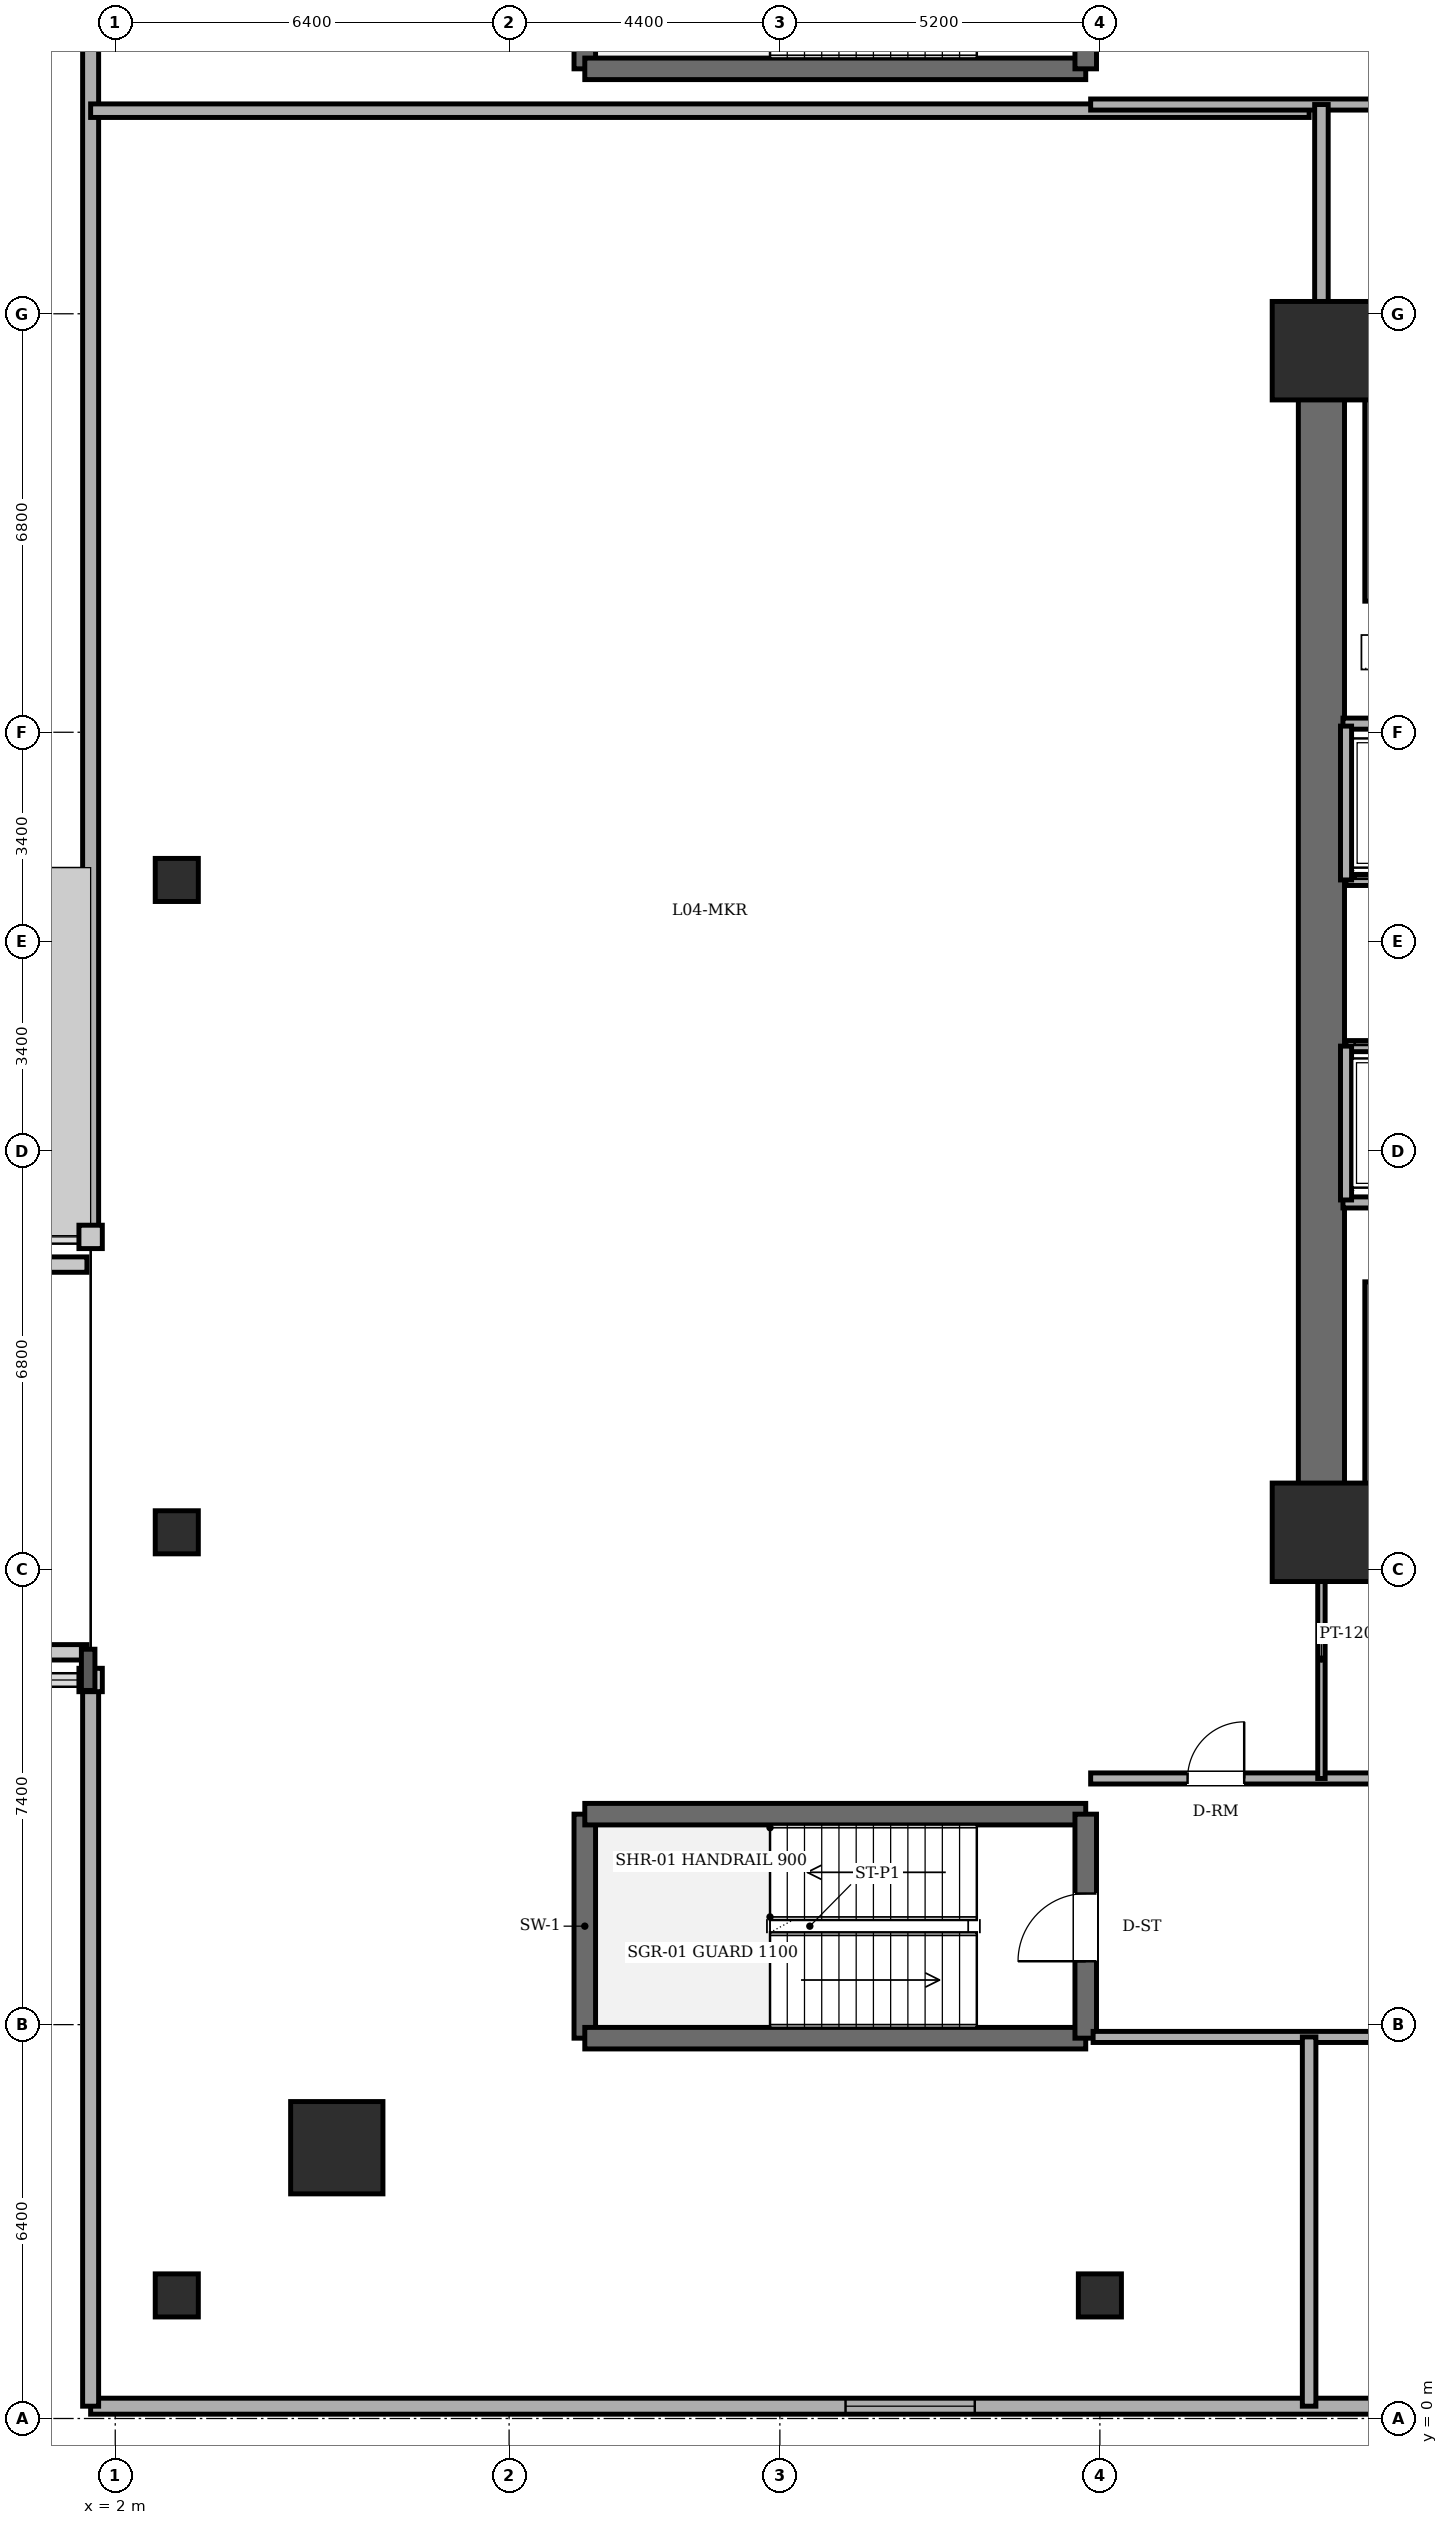
"""IFC4 building model, lengths in metres.
Left out: names, types, materials, properties, quantities, classifications, styles, units other than length and angle.
Written with IfcOpenShell. Run it as: python <this file> out.ifc"""

import sys

from ifc_helpers import new_model, si_unit, direction, frame, frame_2d, origin, origin_2d, place, context, subcontext, project, spatial, rectangle, circle, extrude, element, fill, save


model = new_model("IFC4")
c1 = context("Model", 3, precision=1e-05, world=origin(), true_north=direction((0.0, 1.0)))
c2 = subcontext(c1, "Body", "Model", "MODEL_VIEW")
j1 = project(units=[si_unit("LENGTHUNIT", "METRE"), si_unit("PLANEANGLEUNIT", "RADIAN")], contexts=[c1])
p1 = place(None, origin())
s1 = spatial("IfcSite", under=j1, at=p1, CompositionType="ELEMENT")
p2 = place(p1, origin())
s2 = spatial("IfcBuilding", under=s1, at=p2, CompositionType="ELEMENT")
p3 = place(p2, frame((0.0, 0.0, 14.7)))
s3 = spatial("IfcBuildingStorey", under=s2, at=p3, CompositionType="ELEMENT", Elevation=14.7)
for number, where, z_axis, x_axis in (
    (1, (21.6, 14.4, 0.0), (0.0, 0.0, 1.0), (1.0, 0.0, 0.0)),
    (2, (21.6, 33.6, 0.0), (0.0, 0.0, 1.0), (1.0, 0.0, 0.0)),
):
    element("IfcColumn", number, at=place(p3, frame(where, z_axis=z_axis, x_axis=x_axis)), inside=s3, PredefinedType="COLUMN", context=c2, shape_type="SweptSolid", body=[
        extrude(rectangle(XDim=1.6, YDim=1.6, at=origin_2d()), origin(), (0.0, 0.0, 1.0), 4.65),
    ])
p4 = place(p3, frame((5.6, 4.4, 0.0), z_axis=(0.0, 0.0, 1.0), x_axis=(1.0, 0.0, 0.0)))
e3 = element("IfcColumn", 3, at=p4, inside=s3, PredefinedType="COLUMN", context=c2, shape_type="SweptSolid", body=[
    extrude(circle(Radius=0.75, at=origin_2d()), origin(), (0.0, 0.0, 1.0), 4.65),
])
for number, where, z_axis, x_axis in (
    (4, (3.0, 2.0, 0.0), (0.0, 0.0, 1.0), (1.0, 0.0, 0.0)),
    (5, (18.0, 2.0, 0.0), (0.0, 0.0, 1.0), (1.0, 0.0, 0.0)),
    (6, (3.0, 14.4, 0.0), (0.0, 0.0, 1.0), (1.0, 0.0, 0.0)),
    (7, (3.0, 25.0, 0.0), (0.0, 0.0, 1.0), (1.0, 0.0, 0.0)),
):
    element("IfcColumn", number, at=place(p3, frame(where, z_axis=z_axis, x_axis=x_axis)), inside=s3, PredefinedType="COLUMN", context=c2, shape_type="SweptSolid", body=[
        extrude(rectangle(XDim=0.7, YDim=0.7, at=origin_2d()), origin(), (0.0, 0.0, 1.0), 4.65),
    ])
p5 = place(p3, frame((67.8, 0.2, 0.0), z_axis=(0.0, 0.0, 1.0), x_axis=(-1.0, 0.0, 0.0)))
e8 = element("IfcWall", 8, at=p5, inside=s3, PredefinedType="SOLIDWALL", context=c2, shape_type="SweptSolid", body=[
    extrude(rectangle(XDim=66.2, YDim=0.26, at=frame_2d((33.1, 0.0))), origin(), (0.0, 0.0, 1.0), 4.45),
])
p6 = place(p5, frame((8.517, 0.0, 0.9)))
e9 = element("IfcOpeningElement", 9, at=p6, cuts=e8, PredefinedType="OPENING", context=c2, shape_type="SweptSolid", body=[
    extrude(rectangle(XDim=2.1, YDim=2.0, at=frame_2d((1.05, 1.0))), frame((0.0, 0.14, 0.0), z_axis=(0.0, -1.0, 0.0), x_axis=(1.0, 0.0, 0.0)), (0.0, 0.0, 1.0), 0.28),
])
p7 = place(p5, frame((17.733, 0.0, 0.9)))
e10 = element("IfcOpeningElement", 10, at=p7, cuts=e8, PredefinedType="OPENING", context=c2, shape_type="SweptSolid", body=[
    extrude(rectangle(XDim=2.1, YDim=2.0, at=frame_2d((1.05, 1.0))), frame((0.0, 0.14, 0.0), z_axis=(0.0, -1.0, 0.0), x_axis=(1.0, 0.0, 0.0)), (0.0, 0.0, 1.0), 0.28),
])
p8 = place(p5, frame((33.083, 0.0, 0.9)))
e11 = element("IfcOpeningElement", 11, at=p8, cuts=e8, PredefinedType="OPENING", context=c2, shape_type="SweptSolid", body=[
    extrude(rectangle(XDim=2.1, YDim=2.0, at=frame_2d((1.05, 1.0))), frame((0.0, 0.14, 0.0), z_axis=(0.0, -1.0, 0.0), x_axis=(1.0, 0.0, 0.0)), (0.0, 0.0, 1.0), 0.28),
])
p9 = place(p5, frame((39.217, 0.0, 0.9)))
e12 = element("IfcOpeningElement", 12, at=p9, cuts=e8, PredefinedType="OPENING", context=c2, shape_type="SweptSolid", body=[
    extrude(rectangle(XDim=2.1, YDim=2.0, at=frame_2d((1.05, 1.0))), frame((0.0, 0.14, 0.0), z_axis=(0.0, -1.0, 0.0), x_axis=(1.0, 0.0, 0.0)), (0.0, 0.0, 1.0), 0.28),
])
p10 = place(p5, frame((51.833, 0.0, 0.9)))
e13 = element("IfcOpeningElement", 13, at=p10, cuts=e8, PredefinedType="OPENING", context=c2, shape_type="SweptSolid", body=[
    extrude(rectangle(XDim=2.1, YDim=2.0, at=frame_2d((1.05, 1.0))), frame((0.0, 0.14, 0.0), z_axis=(0.0, -1.0, 0.0), x_axis=(1.0, 0.0, 0.0)), (0.0, 0.0, 1.0), 0.28),
])
p11 = place(p3, frame((1.6, 0.2, 0.0), z_axis=(0.0, 0.0, 1.0), x_axis=(0.0, 1.0, 0.0)))
e14 = element("IfcWall", 14, at=p11, inside=s3, PredefinedType="SOLIDWALL", context=c2, shape_type="SweptSolid", body=[
    extrude(rectangle(XDim=11.8, YDim=0.26, at=frame_2d((5.9, 0.0))), origin(), (0.0, 0.0, 1.0), 4.45),
])
p12 = place(p3, frame((1.6, 19.2, 0.0), z_axis=(0.0, 0.0, 1.0), x_axis=(0.0, 1.0, 0.0)))
e15 = element("IfcWall", 15, at=p12, inside=s3, PredefinedType="SOLIDWALL", context=c2, shape_type="SweptSolid", body=[
    extrude(rectangle(XDim=28.6, YDim=0.26, at=frame_2d((14.3, 0.0))), origin(), (0.0, 0.0, 1.0), 4.45),
])
p13 = place(p3, frame((9.63, 6.18, 0.0), z_axis=(0.0, 0.0, 1.0), x_axis=(0.0, 1.0, 0.0)))
e16 = element("IfcWall", 16, at=p13, inside=s3, PredefinedType="SOLIDWALL", context=c2, shape_type="SweptSolid", body=[
    extrude(rectangle(XDim=3.64, YDim=0.35, at=frame_2d((1.82, 0.0))), origin(), (0.0, 0.0, 1.0), 4.65),
])
for number, where, z_axis, x_axis in (
    (17, (9.63, 9.82, 0.0), (0.0, 0.0, 1.0), (1.0, 0.0, 0.0)),
    (18, (17.77, 6.18, 0.0), (0.0, 0.0, 1.0), (-1.0, 0.0, 0.0)),
):
    element("IfcWall", number, at=place(p3, frame(where, z_axis=z_axis, x_axis=x_axis)), inside=s3, PredefinedType="SOLIDWALL", context=c2, shape_type="SweptSolid", body=[
        extrude(rectangle(XDim=8.14, YDim=0.35, at=frame_2d((4.07, 0.0))), origin(), (0.0, 0.0, 1.0), 4.65),
    ])
p14 = place(p3, frame((17.77, 6.18, 0.0), z_axis=(0.0, 0.0, 1.0), x_axis=(0.0, 1.0, 0.0)))
e19 = element("IfcWall", 19, at=p14, inside=s3, PredefinedType="SOLIDWALL", context=c2, shape_type="SweptSolid", body=[
    extrude(rectangle(XDim=3.64, YDim=0.35, at=frame_2d((1.82, 0.0))), origin(), (0.0, 0.0, 1.0), 4.65),
])
p15 = place(p14, frame((1.25, 0.0, 0.0)))
e20 = element("IfcOpeningElement", 20, at=p15, cuts=e19, PredefinedType="OPENING", context=c2, shape_type="SweptSolid", body=[
    extrude(rectangle(XDim=1.1, YDim=2.15, at=frame_2d((0.55, 1.075))), frame((0.0, 0.185, 0.0), z_axis=(0.0, -1.0, 0.0), x_axis=(1.0, 0.0, 0.0)), (0.0, 0.0, 1.0), 0.37),
])
p16 = place(p3, frame((9.63, 38.18, 0.0), z_axis=(0.0, 0.0, 1.0), x_axis=(0.0, 1.0, 0.0)))
e21 = element("IfcWall", 21, at=p16, inside=s3, PredefinedType="SOLIDWALL", context=c2, shape_type="SweptSolid", body=[
    extrude(rectangle(XDim=3.64, YDim=0.35, at=frame_2d((1.82, 0.0))), origin(), (0.0, 0.0, 1.0), 4.65),
])
p17 = place(p3, frame((17.77, 38.18, 0.0), z_axis=(0.0, 0.0, 1.0), x_axis=(-1.0, 0.0, 0.0)))
e22 = element("IfcWall", 22, at=p17, inside=s3, PredefinedType="SOLIDWALL", context=c2, shape_type="SweptSolid", body=[
    extrude(rectangle(XDim=8.14, YDim=0.35, at=frame_2d((4.07, 0.0))), origin(), (0.0, 0.0, 1.0), 4.65),
])
p18 = place(p3, frame((17.77, 38.18, 0.0), z_axis=(0.0, 0.0, 1.0), x_axis=(0.0, 1.0, 0.0)))
e23 = element("IfcWall", 23, at=p18, inside=s3, PredefinedType="SOLIDWALL", context=c2, shape_type="SweptSolid", body=[
    extrude(rectangle(XDim=3.64, YDim=0.35, at=frame_2d((1.82, 0.0))), origin(), (0.0, 0.0, 1.0), 4.65),
])
p19 = place(p18, frame((1.25, 0.0, 0.0)))
e24 = element("IfcOpeningElement", 24, at=p19, cuts=e23, PredefinedType="OPENING", context=c2, shape_type="SweptSolid", body=[
    extrude(rectangle(XDim=1.1, YDim=2.15, at=frame_2d((0.55, 1.075))), frame((0.0, 0.185, 0.0), z_axis=(0.0, -1.0, 0.0), x_axis=(1.0, 0.0, 0.0)), (0.0, 0.0, 1.0), 0.37),
])
p20 = place(p3, frame((21.6, 14.4, 0.0), z_axis=(0.0, 0.0, 1.0), x_axis=(0.0, 1.0, 0.0)))
e25 = element("IfcWall", 25, at=p20, inside=s3, PredefinedType="SHEAR", context=c2, shape_type="SweptSolid", body=[
    extrude(rectangle(XDim=19.2, YDim=0.75, at=frame_2d((9.6, 0.0))), origin(), (0.0, 0.0, 1.0), 4.45),
])
for number, where, z_axis, x_axis in (
    (26, (21.6, 33.6, 0.0), (0.0, 0.0, 1.0), (1.0, 0.0, 0.0)),
    (27, (37.2, 14.4, 0.0), (0.0, 0.0, 1.0), (-1.0, 0.0, 0.0)),
):
    element("IfcWall", number, at=place(p3, frame(where, z_axis=z_axis, x_axis=x_axis)), inside=s3, PredefinedType="SHEAR", context=c2, shape_type="SweptSolid", body=[
        extrude(rectangle(XDim=15.6, YDim=0.75, at=frame_2d((7.8, 0.0))), origin(), (0.0, 0.0, 1.0), 4.45),
    ])
for number, where, z_axis, x_axis in (
    (28, (22.48, 29.53, 0.0), (0.0, 0.0, 1.0), (0.0, 1.0, 0.0)),
    (29, (22.48, 14.89, 0.0), (0.0, 0.0, 1.0), (0.0, 1.0, 0.0)),
):
    element("IfcWall", number, at=place(p3, frame(where, z_axis=z_axis, x_axis=x_axis)), inside=s3, PredefinedType="SOLIDWALL", context=c2, shape_type="SweptSolid", body=[
        extrude(rectangle(XDim=3.58, YDim=0.35, at=frame_2d((1.79, 0.0))), origin(), (0.0, 0.0, 1.0), 4.45),
    ])
p21 = place(p3, frame((21.95, 27.54, 0.0), z_axis=(0.0, 0.0, 1.0), x_axis=(1.0, 0.0, 0.0)))
e30 = element("IfcWall", 30, at=p21, inside=s3, PredefinedType="PARTITIONING", context=c2, shape_type="SweptSolid", body=[
    extrude(rectangle(XDim=10.56, YDim=0.18, at=frame_2d((5.28, 0.0))), origin(), (0.0, 0.0, 1.0), 4.45),
])
p22 = place(p3, frame((21.95, 19.76, 0.0), z_axis=(0.0, 0.0, 1.0), x_axis=(1.0, 0.0, 0.0)))
e31 = element("IfcWall", 31, at=p22, inside=s3, PredefinedType="PARTITIONING", context=c2, shape_type="SweptSolid", body=[
    extrude(rectangle(XDim=14.87, YDim=0.18, at=frame_2d((7.435, 0.0))), origin(), (0.0, 0.0, 1.0), 4.45),
])
p23 = place(p3, frame((24.02, 25.0, 0.0), z_axis=(0.0, 0.0, 1.0), x_axis=(-1.0, 0.0, 0.0)))
e32 = element("IfcWall", 32, at=p23, inside=s3, PredefinedType="PARTITIONING", context=c2, shape_type="SweptSolid", body=[
    extrude(rectangle(XDim=2.02, YDim=0.18, at=frame_2d((1.01, 0.0))), origin(), (0.0, 0.0, 1.0), 4.45),
])
p24 = place(p23, frame((0.435, 0.0, 0.0)))
e33 = element("IfcOpeningElement", 33, at=p24, cuts=e32, PredefinedType="OPENING", context=c2, shape_type="SweptSolid", body=[
    extrude(rectangle(XDim=1.15, YDim=2.2, at=frame_2d((0.575, 1.1))), frame((0.0, 0.1, 0.0), z_axis=(0.0, -1.0, 0.0), x_axis=(1.0, 0.0, 0.0)), (0.0, 0.0, 1.0), 0.2),
])
p25 = place(p3, frame((22.0, 27.5, 0.0), z_axis=(0.0, 0.0, 1.0), x_axis=(0.0, -1.0, 0.0)))
e34 = element("IfcWall", 34, at=p25, inside=s3, PredefinedType="PARTITIONING", context=c2, shape_type="SweptSolid", body=[
    extrude(rectangle(XDim=2.5, YDim=0.18, at=frame_2d((1.25, 0.0))), origin(), (0.0, 0.0, 1.0), 4.45),
])
p26 = place(p3, frame((22.0, 22.3, 0.0), z_axis=(0.0, 0.0, 1.0), x_axis=(1.0, 0.0, 0.0)))
e35 = element("IfcWall", 35, at=p26, inside=s3, PredefinedType="PARTITIONING", context=c2, shape_type="SweptSolid", body=[
    extrude(rectangle(XDim=2.0, YDim=0.18, at=frame_2d((1.0, 0.0))), origin(), (0.0, 0.0, 1.0), 4.45),
])
p27 = place(p26, frame((0.425, 0.0, 0.0)))
e36 = element("IfcOpeningElement", 36, at=p27, cuts=e35, PredefinedType="OPENING", context=c2, shape_type="SweptSolid", body=[
    extrude(rectangle(XDim=1.15, YDim=2.2, at=frame_2d((0.575, 1.1))), frame((0.0, 0.1, 0.0), z_axis=(0.0, -1.0, 0.0), x_axis=(1.0, 0.0, 0.0)), (0.0, 0.0, 1.0), 0.2),
])
p28 = place(p3, frame((22.0, 22.3, 0.0), z_axis=(0.0, 0.0, 1.0), x_axis=(0.0, -1.0, 0.0)))
e37 = element("IfcWall", 37, at=p28, inside=s3, PredefinedType="PARTITIONING", context=c2, shape_type="SweptSolid", body=[
    extrude(rectangle(XDim=2.5, YDim=0.18, at=frame_2d((1.25, 0.0))), origin(), (0.0, 0.0, 1.0), 4.45),
])
p29 = place(p3, frame((17.89, 6.2, 0.0), z_axis=(0.0, 0.0, 1.0), x_axis=(1.0, 0.0, 0.0)))
e38 = element("IfcWall", 38, at=p29, inside=s3, PredefinedType="PARTITIONING", context=c2, shape_type="SweptSolid", body=[
    extrude(rectangle(XDim=21.91, YDim=0.18, at=frame_2d((10.955, 0.0))), origin(), (0.0, 0.0, 1.0), 4.45),
])
p30 = place(p3, frame((17.85, 10.4, 0.0), z_axis=(0.0, 0.0, 1.0), x_axis=(1.0, 0.0, 0.0)))
e39 = element("IfcWall", 39, at=p30, inside=s3, PredefinedType="PARTITIONING", context=c2, shape_type="SweptSolid", body=[
    extrude(rectangle(XDim=19.45, YDim=0.18, at=frame_2d((9.725, 0.0))), origin(), (0.0, 0.0, 1.0), 4.45),
])
p31 = place(p30, frame((1.575, 0.0, 0.0)))
e40 = element("IfcOpeningElement", 40, at=p31, cuts=e39, PredefinedType="OPENING", context=c2, shape_type="SweptSolid", body=[
    extrude(rectangle(XDim=0.92, YDim=2.1, at=frame_2d((0.46, 1.05))), frame((0.0, 0.1, 0.0), z_axis=(0.0, -1.0, 0.0), x_axis=(1.0, 0.0, 0.0)), (0.0, 0.0, 1.0), 0.2),
])
p32 = place(p30, frame((5.6, 0.0, 0.0)))
e41 = element("IfcOpeningElement", 41, at=p32, cuts=e39, PredefinedType="OPENING", context=c2, shape_type="SweptSolid", body=[
    extrude(rectangle(XDim=0.9, YDim=2.1, at=frame_2d((0.45, 1.05))), frame((0.0, 0.1, 0.0), z_axis=(0.0, -1.0, 0.0), x_axis=(1.0, 0.0, 0.0)), (0.0, 0.0, 1.0), 0.2),
])
p33 = place(p30, frame((13.21, 0.0, 0.0)))
e42 = element("IfcOpeningElement", 42, at=p33, cuts=e39, PredefinedType="OPENING", context=c2, shape_type="SweptSolid", body=[
    extrude(rectangle(XDim=0.86, YDim=2.1, at=frame_2d((0.43, 1.05))), frame((0.0, 0.1, 0.0), z_axis=(0.0, -1.0, 0.0), x_axis=(1.0, 0.0, 0.0)), (0.0, 0.0, 1.0), 0.2),
])
p34 = place(p3, frame((1.6, 37.5, 0.0), z_axis=(0.0, 0.0, 1.0), x_axis=(1.0, 0.0, 0.0)))
e43 = element("IfcWall", 43, at=p34, inside=s3, PredefinedType="PARTITIONING", context=c2, shape_type="SweptSolid", body=[
    extrude(rectangle(XDim=19.8, YDim=0.22, at=frame_2d((9.9, 0.0))), origin(), (0.0, 0.0, 1.0), 4.45),
])
p35 = place(p3, frame((17.85, 37.6, 0.0), z_axis=(0.0, 0.0, 1.0), x_axis=(1.0, 0.0, 0.0)))
e44 = element("IfcWall", 44, at=p35, inside=s3, PredefinedType="PARTITIONING", context=c2, shape_type="SweptSolid", body=[
    extrude(rectangle(XDim=19.45, YDim=0.18, at=frame_2d((9.725, 0.0))), origin(), (0.0, 0.0, 1.0), 4.45),
])
p36 = place(p35, frame((7.99, 0.0, 0.0)))
e45 = element("IfcOpeningElement", 45, at=p36, cuts=e44, PredefinedType="OPENING", context=c2, shape_type="SweptSolid", body=[
    extrude(rectangle(XDim=0.92, YDim=2.1, at=frame_2d((0.46, 1.05))), frame((0.0, 0.1, 0.0), z_axis=(0.0, -1.0, 0.0), x_axis=(1.0, 0.0, 0.0)), (0.0, 0.0, 1.0), 0.2),
])
p37 = place(p3, frame((21.4, 0.2, 0.0), z_axis=(0.0, 0.0, 1.0), x_axis=(0.0, 1.0, 0.0)))
e46 = element("IfcWall", 46, at=p37, inside=s3, PredefinedType="PARTITIONING", context=c2, shape_type="SweptSolid", body=[
    extrude(rectangle(XDim=6.0, YDim=0.22, at=frame_2d((3.0, 0.0))), origin(), (0.0, 0.0, 1.0), 4.45),
])
p38 = place(p3, frame((21.6, 10.4, 0.0), z_axis=(0.0, 0.0, 1.0), x_axis=(0.0, 1.0, 0.0)))
e47 = element("IfcWall", 47, at=p38, inside=s3, PredefinedType="PARTITIONING", context=c2, shape_type="SweptSolid", body=[
    extrude(rectangle(XDim=3.88, YDim=0.12, at=frame_2d((1.94, 0.0))), origin(), (0.0, 0.0, 1.0), 3.632),
])
p39 = place(p3, frame((21.6, 33.72, 0.0), z_axis=(0.0, 0.0, 1.0), x_axis=(0.0, 1.0, 0.0)))
e48 = element("IfcWall", 48, at=p39, inside=s3, PredefinedType="PARTITIONING", context=c2, shape_type="SweptSolid", body=[
    extrude(rectangle(XDim=3.88, YDim=0.22, at=frame_2d((1.94, 0.0))), origin(), (0.0, 0.0, 1.0), 3.632),
])
p40 = place(p10, origin())
e49 = element("IfcWindow", 49, at=p40, inside=s3, PartitioningType="DOUBLE_PANEL_VERTICAL", PredefinedType="WINDOW", context=c2, shape_type="SweptSolid", body=[
    extrude(rectangle(XDim=2.1, YDim=2.0, at=frame_2d((1.05, 1.0))), frame((0.0, 0.03, 0.0), z_axis=(0.0, -1.0, 0.0), x_axis=(1.0, 0.0, 0.0)), (0.0, 0.0, 1.0), 0.06),
])
fill(e13, e49)
p41 = place(p15, origin())
e50 = element("IfcDoor", 50, at=p41, inside=s3, OperationType="SINGLE_SWING_LEFT", PredefinedType="DOOR", context=c2, shape_type="SweptSolid", body=[
    extrude(rectangle(XDim=1.1, YDim=2.15, at=frame_2d((0.55, 1.075))), frame((0.0, 0.025, 0.0), z_axis=(0.0, -1.0, 0.0), x_axis=(1.0, 0.0, 0.0)), (0.0, 0.0, 1.0), 0.05),
])
fill(e20, e50)
p42 = place(p31, origin())
e51 = element("IfcDoor", 51, at=p42, inside=s3, OperationType="SINGLE_SWING_RIGHT", PredefinedType="DOOR", context=c2, shape_type="SweptSolid", body=[
    extrude(rectangle(XDim=0.92, YDim=2.1, at=frame_2d((0.46, 1.05))), frame((0.0, 0.025, 0.0), z_axis=(0.0, -1.0, 0.0), x_axis=(1.0, 0.0, 0.0)), (0.0, 0.0, 1.0), 0.05),
])
fill(e40, e51)
save(model, sys.argv[1])
